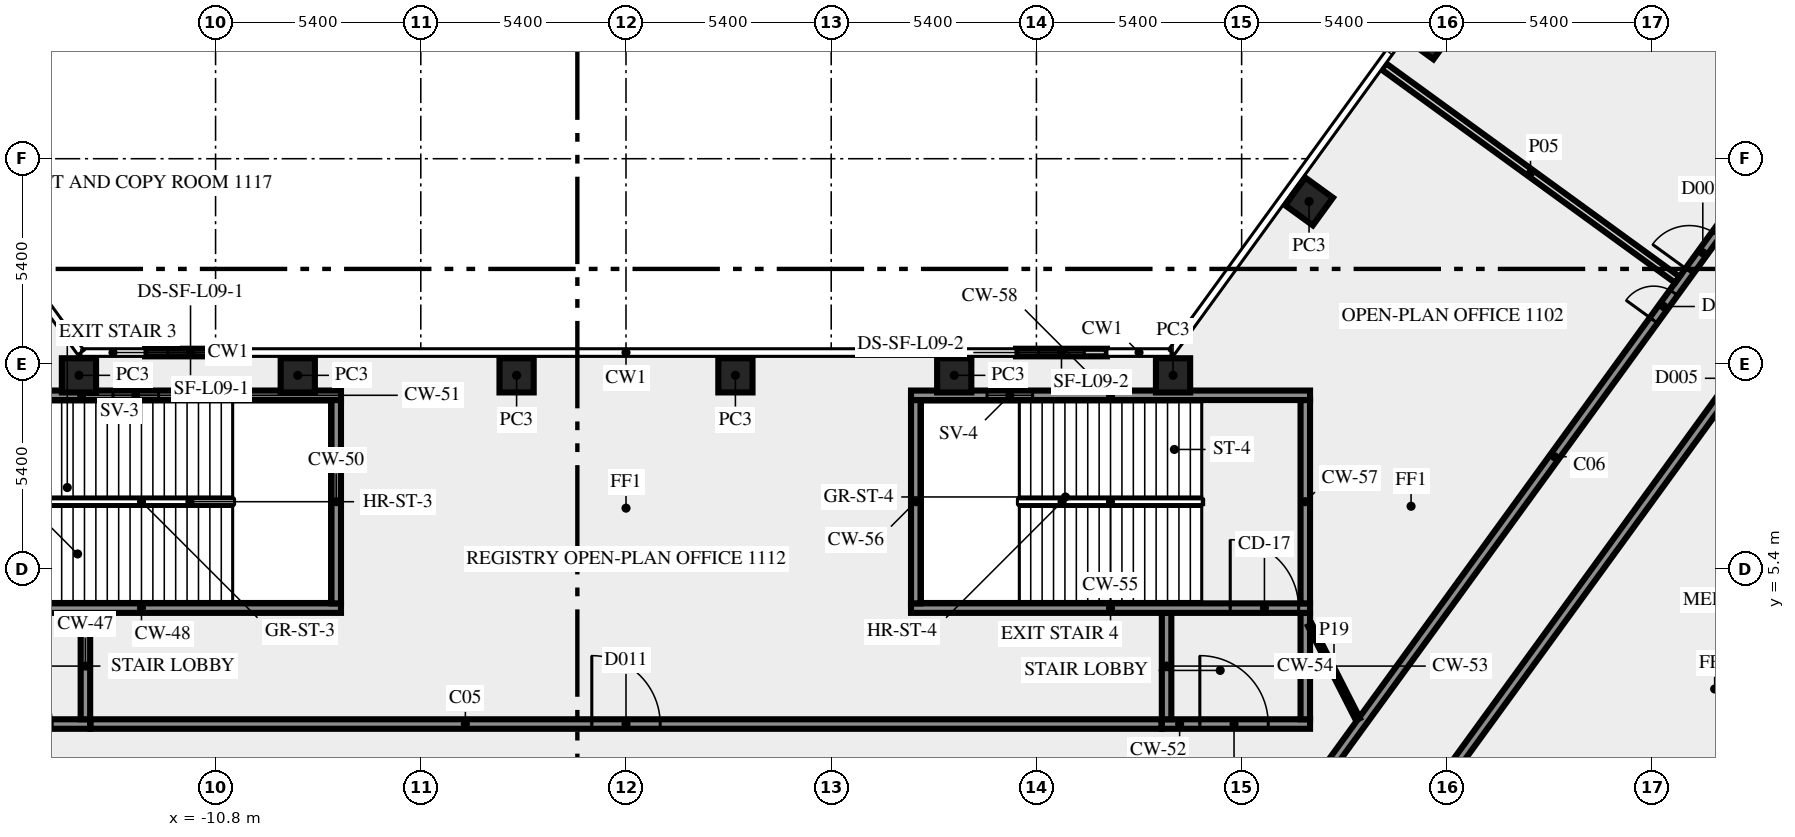
"""IFC4 building model, lengths in metres.
Left out: names, types, materials, properties, quantities, classifications, styles, units other than length and angle.
Written with IfcOpenShell. Run it as: python <this file> out.ifc"""

import sys

from ifc_helpers import new_model, si_unit, direction, frame, frame_2d, origin, origin_2d, place, context, subcontext, project, spatial, rectangle, extrude, element, fill, save


model = new_model("IFC4")
c1 = context("Model", 3, precision=1e-05, world=origin(), true_north=direction((0.0, 1.0)))
c2 = subcontext(c1, "Body", "Model", "MODEL_VIEW")
j1 = project(units=[si_unit("LENGTHUNIT", "METRE"), si_unit("PLANEANGLEUNIT", "RADIAN")], contexts=[c1])
p1 = place(None, origin())
s1 = spatial("IfcSite", under=j1, at=p1, CompositionType="ELEMENT")
p2 = place(p1, origin())
s2 = spatial("IfcBuilding", under=s1, at=p2, CompositionType="ELEMENT")
p3 = place(p2, frame((0.0, 0.0, 51.0)))
s3 = spatial("IfcBuildingStorey", under=s2, at=p3, CompositionType="ELEMENT", Elevation=51.0)
for number, where, z_axis, x_axis in (
    (1, (21.147, 19.444, 0.0), (0.0, 0.0, 1.0), (-0.588, -0.809, 0.0)),
    (2, (17.974, 15.075, 0.0), (0.0, 0.0, 1.0), (-0.588, -0.809, 0.0)),
    (3, (14.395, 10.5, 0.0), (0.0, 0.0, 1.0), (-1.0, 0.0, 0.0)),
    (4, (8.637, 10.5, 0.0), (0.0, 0.0, 1.0), (-1.0, 0.0, 0.0)),
    (5, (2.879, 10.5, 0.0), (0.0, 0.0, 1.0), (-1.0, 0.0, 0.0)),
    (6, (-2.879, 10.5, 0.0), (0.0, 0.0, 1.0), (-1.0, 0.0, 0.0)),
    (7, (-8.637, 10.5, 0.0), (0.0, 0.0, 1.0), (-1.0, 0.0, 0.0)),
    (8, (-14.395, 10.5, 0.0), (0.0, 0.0, 1.0), (-1.0, 0.0, 0.0)),
):
    element("IfcColumn", number, at=place(p3, frame(where, z_axis=z_axis, x_axis=x_axis)), inside=s3, PredefinedType="COLUMN", context=c2, shape_type="SweptSolid", body=[
        extrude(rectangle(XDim=0.9, YDim=0.9, at=origin_2d()), origin(), (0.0, 0.0, 1.0), 3.65),
    ])
p4 = place(p3, frame((12.655, 11.1, 0.0), z_axis=(0.0, 0.0, 1.0), x_axis=(-1.0, 0.0, 0.0)))
e9 = element("IfcWall", 9, at=p4, inside=s3, PredefinedType="SOLIDWALL", context=c2, shape_type="SweptSolid", body=[
    extrude(rectangle(XDim=2.392, YDim=0.2, at=frame_2d((1.196, 0.0))), origin(), (0.0, 0.0, 1.0), 3.65),
])
p5 = place(p4, frame((0.596, 0.0, 1.0)))
e10 = element("IfcOpeningElement", 10, at=p5, cuts=e9, PredefinedType="OPENING", context=c2, shape_type="SweptSolid", body=[
    extrude(rectangle(XDim=1.2, YDim=1.2, at=frame_2d((0.6, 0.6))), frame((0.0, 0.11, 0.0), z_axis=(0.0, -1.0, 0.0), x_axis=(1.0, 0.0, 0.0)), (0.0, 0.0, 1.0), 0.22),
])
p6 = place(p3, frame((-10.263, 11.1, 0.0), z_axis=(0.0, 0.0, 1.0), x_axis=(-1.0, 0.0, 0.0)))
e11 = element("IfcWall", 11, at=p6, inside=s3, PredefinedType="SOLIDWALL", context=c2, shape_type="SweptSolid", body=[
    extrude(rectangle(XDim=2.392, YDim=0.2, at=frame_2d((1.196, 0.0))), origin(), (0.0, 0.0, 1.0), 3.65),
])
p7 = place(p6, frame((0.596, 0.0, 1.0)))
e12 = element("IfcOpeningElement", 12, at=p7, cuts=e11, PredefinedType="OPENING", context=c2, shape_type="SweptSolid", body=[
    extrude(rectangle(XDim=1.2, YDim=1.2, at=frame_2d((0.6, 0.6))), frame((0.0, 0.11, 0.0), z_axis=(0.0, -1.0, 0.0), x_axis=(1.0, 0.0, 0.0)), (0.0, 0.0, 1.0), 0.22),
])
p8 = place(p3, frame((-18.0, 1.325, 0.0), z_axis=(0.0, 0.0, 1.0), x_axis=(1.0, 0.0, 0.0)))
e13 = element("IfcWall", 13, at=p8, inside=s3, PredefinedType="SHEAR", context=c2, shape_type="SweptSolid", body=[
    extrude(rectangle(XDim=3.9, YDim=0.25, at=frame_2d((1.95, 0.0))), origin(), (0.0, 0.0, 1.0), 3.65),
])
p9 = place(p8, frame((1.1, 0.0, 0.0)))
e14 = element("IfcOpeningElement", 14, at=p9, cuts=e13, PredefinedType="OPENING", context=c2, shape_type="SweptSolid", body=[
    extrude(rectangle(XDim=1.8, YDim=2.1, at=frame_2d((0.9, 1.05))), frame((0.0, 0.135, 0.0), z_axis=(0.0, -1.0, 0.0), x_axis=(1.0, 0.0, 0.0)), (0.0, 0.0, 1.0), 0.27),
])
p10 = place(p3, frame((-14.225, 1.45, 0.0), z_axis=(0.0, 0.0, 1.0), x_axis=(0.0, 1.0, 0.0)))
e15 = element("IfcWall", 15, at=p10, inside=s3, PredefinedType="SHEAR", context=c2, shape_type="SweptSolid", body=[
    extrude(rectangle(XDim=2.8, YDim=0.25, at=frame_2d((1.4, 0.0))), origin(), (0.0, 0.0, 1.0), 3.65),
])
p11 = place(p3, frame((-18.0, 4.375, 0.0), z_axis=(0.0, 0.0, 1.0), x_axis=(1.0, 0.0, 0.0)))
e16 = element("IfcWall", 16, at=p11, inside=s3, PredefinedType="SHEAR", context=c2, shape_type="SweptSolid", body=[
    extrude(rectangle(XDim=10.5, YDim=0.25, at=frame_2d((5.25, 0.0))), origin(), (0.0, 0.0, 1.0), 3.65),
])
p12 = place(p11, frame((0.3, 0.0, 0.0)))
e17 = element("IfcOpeningElement", 17, at=p12, cuts=e16, PredefinedType="OPENING", context=c2, shape_type="SweptSolid", body=[
    extrude(rectangle(XDim=1.8, YDim=2.1, at=frame_2d((0.9, 1.05))), frame((0.0, 0.135, 0.0), z_axis=(0.0, -1.0, 0.0), x_axis=(1.0, 0.0, 0.0)), (0.0, 0.0, 1.0), 0.27),
])
p13 = place(p3, frame((-7.625, 4.5, 0.0), z_axis=(0.0, 0.0, 1.0), x_axis=(0.0, 1.0, 0.0)))
e18 = element("IfcWall", 18, at=p13, inside=s3, PredefinedType="SHEAR", context=c2, shape_type="SweptSolid", body=[
    extrude(rectangle(XDim=5.35, YDim=0.25, at=frame_2d((2.675, 0.0))), origin(), (0.0, 0.0, 1.0), 3.65),
])
p14 = place(p3, frame((-18.0, 9.975, 0.0), z_axis=(0.0, 0.0, 1.0), x_axis=(1.0, 0.0, 0.0)))
e19 = element("IfcWall", 19, at=p14, inside=s3, PredefinedType="SHEAR", context=c2, shape_type="SweptSolid", body=[
    extrude(rectangle(XDim=10.5, YDim=0.25, at=frame_2d((5.25, 0.0))), origin(), (0.0, 0.0, 1.0), 3.65),
])
p15 = place(p14, frame((4.5, 0.0, 1.0)))
e20 = element("IfcOpeningElement", 20, at=p15, cuts=e19, PredefinedType="OPENING", context=c2, shape_type="SweptSolid", body=[
    extrude(rectangle(XDim=1.2, YDim=1.2, at=frame_2d((0.6, 0.6))), frame((0.0, 0.135, 0.0), z_axis=(0.0, -1.0, 0.0), x_axis=(1.0, 0.0, 0.0)), (0.0, 0.0, 1.0), 0.27),
])
p16 = place(p3, frame((14.1, 1.325, 0.0), z_axis=(0.0, 0.0, 1.0), x_axis=(1.0, 0.0, 0.0)))
e21 = element("IfcWall", 21, at=p16, inside=s3, PredefinedType="SHEAR", context=c2, shape_type="SweptSolid", body=[
    extrude(rectangle(XDim=3.9, YDim=0.25, at=frame_2d((1.95, 0.0))), origin(), (0.0, 0.0, 1.0), 3.65),
])
p17 = place(p16, frame((1.0, 0.0, 0.0)))
e22 = element("IfcOpeningElement", 22, at=p17, cuts=e21, PredefinedType="OPENING", context=c2, shape_type="SweptSolid", body=[
    extrude(rectangle(XDim=1.8, YDim=2.1, at=frame_2d((0.9, 1.05))), frame((0.0, 0.135, 0.0), z_axis=(0.0, -1.0, 0.0), x_axis=(1.0, 0.0, 0.0)), (0.0, 0.0, 1.0), 0.27),
])
for number, where, z_axis, x_axis in (
    (23, (14.225, 1.45, 0.0), (0.0, 0.0, 1.0), (0.0, 1.0, 0.0)),
    (24, (17.875, 1.45, 0.0), (0.0, 0.0, 1.0), (0.0, 1.0, 0.0)),
):
    element("IfcWall", number, at=place(p3, frame(where, z_axis=z_axis, x_axis=x_axis)), inside=s3, PredefinedType="SHEAR", context=c2, shape_type="SweptSolid", body=[
        extrude(rectangle(XDim=2.8, YDim=0.25, at=frame_2d((1.4, 0.0))), origin(), (0.0, 0.0, 1.0), 3.65),
    ])
p18 = place(p3, frame((7.5, 4.375, 0.0), z_axis=(0.0, 0.0, 1.0), x_axis=(1.0, 0.0, 0.0)))
e25 = element("IfcWall", 25, at=p18, inside=s3, PredefinedType="SHEAR", context=c2, shape_type="SweptSolid", body=[
    extrude(rectangle(XDim=10.5, YDim=0.25, at=frame_2d((5.25, 0.0))), origin(), (0.0, 0.0, 1.0), 3.65),
])
p19 = place(p18, frame((8.4, 0.0, 0.0)))
e26 = element("IfcOpeningElement", 26, at=p19, cuts=e25, PredefinedType="OPENING", context=c2, shape_type="SweptSolid", body=[
    extrude(rectangle(XDim=1.8, YDim=2.1, at=frame_2d((0.9, 1.05))), frame((0.0, 0.135, 0.0), z_axis=(0.0, -1.0, 0.0), x_axis=(1.0, 0.0, 0.0)), (0.0, 0.0, 1.0), 0.27),
])
for number, where, z_axis, x_axis in (
    (27, (7.625, 4.5, 0.0), (0.0, 0.0, 1.0), (0.0, 1.0, 0.0)),
    (28, (17.875, 4.5, 0.0), (0.0, 0.0, 1.0), (0.0, 1.0, 0.0)),
):
    element("IfcWall", number, at=place(p3, frame(where, z_axis=z_axis, x_axis=x_axis)), inside=s3, PredefinedType="SHEAR", context=c2, shape_type="SweptSolid", body=[
        extrude(rectangle(XDim=5.35, YDim=0.25, at=frame_2d((2.675, 0.0))), origin(), (0.0, 0.0, 1.0), 3.65),
    ])
p20 = place(p3, frame((7.5, 9.975, 0.0), z_axis=(0.0, 0.0, 1.0), x_axis=(1.0, 0.0, 0.0)))
e29 = element("IfcWall", 29, at=p20, inside=s3, PredefinedType="SHEAR", context=c2, shape_type="SweptSolid", body=[
    extrude(rectangle(XDim=10.5, YDim=0.25, at=frame_2d((5.25, 0.0))), origin(), (0.0, 0.0, 1.0), 3.65),
])
p21 = place(p20, frame((2.0, 0.0, 1.0)))
e30 = element("IfcOpeningElement", 30, at=p21, cuts=e29, PredefinedType="OPENING", context=c2, shape_type="SweptSolid", body=[
    extrude(rectangle(XDim=1.2, YDim=1.2, at=frame_2d((0.6, 0.6))), frame((0.0, 0.135, 0.0), z_axis=(0.0, -1.0, 0.0), x_axis=(1.0, 0.0, 0.0)), (0.0, 0.0, 1.0), 0.27),
])
p22 = place(p3, frame((-14.09, 1.325, 0.0), z_axis=(0.0, 0.0, 1.0), x_axis=(1.0, 0.0, 0.0)))
e31 = element("IfcWall", 31, at=p22, inside=s3, PredefinedType="SOLIDWALL", context=c2, shape_type="SweptSolid", body=[
    extrude(rectangle(XDim=28.18, YDim=0.25, at=frame_2d((14.09, 0.0))), origin(), (0.0, 0.0, 1.0), 3.65),
])
p23 = place(p22, frame((13.19, 0.0, 0.0)))
e32 = element("IfcOpeningElement", 32, at=p23, cuts=e31, PredefinedType="OPENING", context=c2, shape_type="SweptSolid", body=[
    extrude(rectangle(XDim=1.8, YDim=2.1, at=frame_2d((0.9, 1.05))), frame((0.0, 0.135, 0.0), z_axis=(0.0, -1.0, 0.0), x_axis=(1.0, 0.0, 0.0)), (0.0, 0.0, 1.0), 0.27),
])
p24 = place(p3, frame((17.545, -1.125, 0.0), z_axis=(0.0, 0.0, 1.0), x_axis=(0.587786323093, 0.809016216391, 0.0)))
e33 = element("IfcWall", 33, at=p24, inside=s3, PredefinedType="SOLIDWALL", context=c2, shape_type="SweptSolid", body=[
    extrude(rectangle(XDim=33.493, YDim=0.25, at=frame_2d((16.747, 0.0))), origin(), (0.0, 0.0, 1.0), 3.65),
])
p25 = place(p24, frame((16.158, 0.0, 0.0)))
e34 = element("IfcOpeningElement", 34, at=p25, cuts=e33, PredefinedType="OPENING", context=c2, shape_type="SweptSolid", body=[
    extrude(rectangle(XDim=0.9, YDim=2.1, at=frame_2d((0.45, 1.05))), frame((0.0, 0.135, 0.0), z_axis=(0.0, -1.0, 0.0), x_axis=(1.0, 0.0, 0.0)), (0.0, 0.0, 1.0), 0.27),
])
p26 = place(p24, frame((32.253, 0.0, 0.0)))
e35 = element("IfcOpeningElement", 35, at=p26, cuts=e33, PredefinedType="OPENING", context=c2, shape_type="SweptSolid", body=[
    extrude(rectangle(XDim=0.9, YDim=2.1, at=frame_2d((0.45, 1.05))), frame((0.0, 0.135, 0.0), z_axis=(0.0, -1.0, 0.0), x_axis=(1.0, 0.0, 0.0)), (0.0, 0.0, 1.0), 0.27),
])
p27 = place(p24, frame((17.757, 0.0, 0.0)))
e36 = element("IfcOpeningElement", 36, at=p27, cuts=e33, PredefinedType="OPENING", context=c2, shape_type="SweptSolid", body=[
    extrude(rectangle(XDim=1.2, YDim=2.1, at=frame_2d((0.6, 1.05))), frame((0.0, 0.135, 0.0), z_axis=(0.0, -1.0, 0.0), x_axis=(1.0, 0.0, 0.0)), (0.0, 0.0, 1.0), 0.27),
])
p28 = place(p3, frame((46.641, 34.413, 0.0), z_axis=(0.0, 0.0, 1.0), x_axis=(-0.587785682186, -0.809016682039, 0.0)))
e37 = element("IfcWall", 37, at=p28, inside=s3, PredefinedType="SOLIDWALL", context=c2, shape_type="SweptSolid", body=[
    extrude(rectangle(XDim=44.42, YDim=0.25, at=frame_2d((22.21, 0.0))), origin(), (0.0, 0.0, 1.0), 3.65),
])
p29 = place(p28, frame((12.755, 0.0, 0.0)))
e38 = element("IfcOpeningElement", 38, at=p29, cuts=e37, PredefinedType="OPENING", context=c2, shape_type="SweptSolid", body=[
    extrude(rectangle(XDim=0.9, YDim=2.1, at=frame_2d((0.45, 1.05))), frame((0.0, 0.135, 0.0), z_axis=(0.0, -1.0, 0.0), x_axis=(1.0, 0.0, 0.0)), (0.0, 0.0, 1.0), 0.27),
])
p30 = place(p28, frame((29.205, 0.0, 0.0)))
e39 = element("IfcOpeningElement", 39, at=p30, cuts=e37, PredefinedType="OPENING", context=c2, shape_type="SweptSolid", body=[
    extrude(rectangle(XDim=0.9, YDim=2.1, at=frame_2d((0.45, 1.05))), frame((0.0, 0.135, 0.0), z_axis=(0.0, -1.0, 0.0), x_axis=(1.0, 0.0, 0.0)), (0.0, 0.0, 1.0), 0.27),
])
p31 = place(p28, frame((14.354, 0.0, 0.0)))
e40 = element("IfcOpeningElement", 40, at=p31, cuts=e37, PredefinedType="OPENING", context=c2, shape_type="SweptSolid", body=[
    extrude(rectangle(XDim=0.9, YDim=2.1, at=frame_2d((0.45, 1.05))), frame((0.0, 0.135, 0.0), z_axis=(0.0, -1.0, 0.0), x_axis=(1.0, 0.0, 0.0)), (0.0, 0.0, 1.0), 0.27),
])
p32 = place(p28, frame((27.604, 0.0, 0.0)))
e41 = element("IfcOpeningElement", 41, at=p32, cuts=e37, PredefinedType="OPENING", context=c2, shape_type="SweptSolid", body=[
    extrude(rectangle(XDim=0.9, YDim=2.1, at=frame_2d((0.45, 1.05))), frame((0.0, 0.135, 0.0), z_axis=(0.0, -1.0, 0.0), x_axis=(1.0, 0.0, 0.0)), (0.0, 0.0, 1.0), 0.27),
])
p33 = place(p28, frame((0.225, 0.0, 0.0)))
e42 = element("IfcOpeningElement", 42, at=p33, cuts=e37, PredefinedType="OPENING", context=c2, shape_type="SweptSolid", body=[
    extrude(rectangle(XDim=0.9, YDim=2.1, at=frame_2d((0.45, 1.05))), frame((0.0, 0.135, 0.0), z_axis=(0.0, -1.0, 0.0), x_axis=(1.0, 0.0, 0.0)), (0.0, 0.0, 1.0), 0.27),
])
p34 = place(p3, frame((27.664, 13.016, 0.0), z_axis=(0.0, 0.0, 1.0), x_axis=(-0.80900684162, 0.587799226107, 0.0)))
e43 = element("IfcWall", 43, at=p34, inside=s3, PredefinedType="SOLIDWALL", context=c2, shape_type="SweptSolid", body=[
    extrude(rectangle(XDim=9.55, YDim=0.2, at=frame_2d((4.775, 0.0))), origin(), (0.0, 0.0, 1.0), 2.75),
])
p35 = place(p3, frame((18.0, 3.925, 0.0), z_axis=(0.0, 0.0, 1.0), x_axis=(0.453950796792, -0.891026752736, 0.0)))
e44 = element("IfcWall", 44, at=p35, inside=s3, PredefinedType="PARTITIONING", context=c2, shape_type="SweptSolid", body=[
    extrude(rectangle(XDim=2.778, YDim=0.12, at=frame_2d((1.389, 0.0))), origin(), (0.0, 0.0, 1.0), 3.65),
])
p36 = place(p5, origin())
e45 = element("IfcWindow", 45, at=p36, inside=s3, PartitioningType="SINGLE_PANEL", PredefinedType="WINDOW", context=c2, shape_type="SweptSolid", body=[
    extrude(rectangle(XDim=1.2, YDim=1.2, at=frame_2d((0.6, 0.6))), frame((0.0, 0.03, 0.0), z_axis=(0.0, -1.0, 0.0), x_axis=(1.0, 0.0, 0.0)), (0.0, 0.0, 1.0), 0.06),
])
fill(e10, e45)
p37 = place(p7, origin())
e46 = element("IfcWindow", 46, at=p37, inside=s3, PartitioningType="SINGLE_PANEL", PredefinedType="WINDOW", context=c2, shape_type="SweptSolid", body=[
    extrude(rectangle(XDim=1.2, YDim=1.2, at=frame_2d((0.6, 0.6))), frame((0.0, 0.03, 0.0), z_axis=(0.0, -1.0, 0.0), x_axis=(1.0, 0.0, 0.0)), (0.0, 0.0, 1.0), 0.06),
])
fill(e12, e46)
p38 = place(p9, origin())
e47 = element("IfcDoor", 47, at=p38, inside=s3, OperationType="DOUBLE_DOOR_SINGLE_SWING", PredefinedType="DOOR", context=c2, shape_type="SweptSolid", body=[
    extrude(rectangle(XDim=1.8, YDim=2.1, at=frame_2d((0.9, 1.05))), frame((0.0, 0.025, 0.0), z_axis=(0.0, -1.0, 0.0), x_axis=(1.0, 0.0, 0.0)), (0.0, 0.0, 1.0), 0.05),
])
fill(e14, e47)
p39 = place(p15, origin())
e48 = element("IfcWindow", 48, at=p39, inside=s3, PartitioningType="SINGLE_PANEL", PredefinedType="WINDOW", context=c2, shape_type="SweptSolid", body=[
    extrude(rectangle(XDim=1.2, YDim=1.2, at=frame_2d((0.6, 0.6))), frame((0.0, 0.03, 0.0), z_axis=(0.0, -1.0, 0.0), x_axis=(1.0, 0.0, 0.0)), (0.0, 0.0, 1.0), 0.06),
])
fill(e20, e48)
p40 = place(p17, origin())
e49 = element("IfcDoor", 49, at=p40, inside=s3, OperationType="DOUBLE_DOOR_SINGLE_SWING", PredefinedType="DOOR", context=c2, shape_type="SweptSolid", body=[
    extrude(rectangle(XDim=1.8, YDim=2.1, at=frame_2d((0.9, 1.05))), frame((0.0, 0.025, 0.0), z_axis=(0.0, -1.0, 0.0), x_axis=(1.0, 0.0, 0.0)), (0.0, 0.0, 1.0), 0.05),
])
fill(e22, e49)
p41 = place(p19, origin())
e50 = element("IfcDoor", 50, at=p41, inside=s3, OperationType="DOUBLE_DOOR_SINGLE_SWING", PredefinedType="DOOR", context=c2, shape_type="SweptSolid", body=[
    extrude(rectangle(XDim=1.8, YDim=2.1, at=frame_2d((0.9, 1.05))), frame((0.0, 0.025, 0.0), z_axis=(0.0, -1.0, 0.0), x_axis=(1.0, 0.0, 0.0)), (0.0, 0.0, 1.0), 0.05),
])
fill(e26, e50)
p42 = place(p21, origin())
e51 = element("IfcWindow", 51, at=p42, inside=s3, PartitioningType="SINGLE_PANEL", PredefinedType="WINDOW", context=c2, shape_type="SweptSolid", body=[
    extrude(rectangle(XDim=1.2, YDim=1.2, at=frame_2d((0.6, 0.6))), frame((0.0, 0.03, 0.0), z_axis=(0.0, -1.0, 0.0), x_axis=(1.0, 0.0, 0.0)), (0.0, 0.0, 1.0), 0.06),
])
fill(e30, e51)
p43 = place(p25, origin())
e52 = element("IfcDoor", 52, at=p43, inside=s3, OperationType="SINGLE_SWING_RIGHT", PredefinedType="DOOR", context=c2, shape_type="SweptSolid", body=[
    extrude(rectangle(XDim=0.9, YDim=2.1, at=frame_2d((0.45, 1.05))), frame((0.0, 0.025, 0.0), z_axis=(0.0, -1.0, 0.0), x_axis=(1.0, 0.0, 0.0)), (0.0, 0.0, 1.0), 0.05),
])
fill(e34, e52)
p44 = place(p23, origin())
e53 = element("IfcDoor", 53, at=p44, inside=s3, OperationType="DOUBLE_DOOR_SINGLE_SWING", PredefinedType="DOOR", context=c2, shape_type="SweptSolid", body=[
    extrude(rectangle(XDim=1.8, YDim=2.1, at=frame_2d((0.9, 1.05))), frame((0.0, 0.025, 0.0), z_axis=(0.0, -1.0, 0.0), x_axis=(1.0, 0.0, 0.0)), (0.0, 0.0, 1.0), 0.05),
])
fill(e32, e53)
p45 = place(p27, origin())
e54 = element("IfcDoor", 54, at=p45, inside=s3, OperationType="SINGLE_SWING_LEFT", PredefinedType="DOOR", context=c2, shape_type="SweptSolid", body=[
    extrude(rectangle(XDim=1.2, YDim=2.1, at=frame_2d((0.6, 1.05))), frame((0.0, 0.025, 0.0), z_axis=(0.0, -1.0, 0.0), x_axis=(1.0, 0.0, 0.0)), (0.0, 0.0, 1.0), 0.05),
])
fill(e36, e54)
save(model, sys.argv[1])
